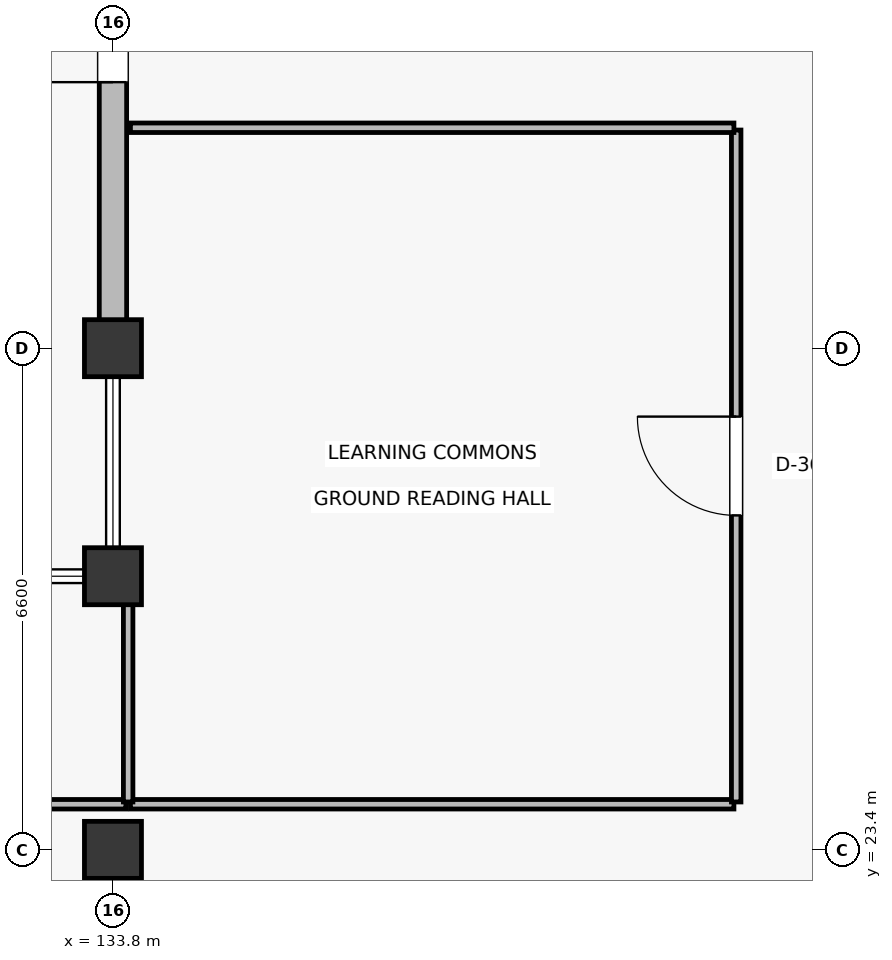
"""IFC4 building model, lengths in metres.
Left out: names, types, materials, properties, quantities, classifications, styles, units other than length and angle.
Written with IfcOpenShell. Run it as: python <this file> out.ifc"""

import sys

from ifc_helpers import new_model, si_unit, direction, frame, frame_2d, origin, origin_2d, place, context, subcontext, project, spatial, rectangle, extrude, element, fill, save


model = new_model("IFC4")
c1 = context("Model", 3, precision=1e-05, world=origin(), true_north=direction((0.0, 1.0)))
c2 = subcontext(c1, "Body", "Model", "MODEL_VIEW")
j1 = project(units=[si_unit("LENGTHUNIT", "METRE"), si_unit("PLANEANGLEUNIT", "RADIAN")], contexts=[c1])
p1 = place(None, origin())
s1 = spatial("IfcSite", under=j1, at=p1, CompositionType="ELEMENT")
p2 = place(p1, origin())
s2 = spatial("IfcBuilding", under=s1, at=p2, CompositionType="ELEMENT")
p3 = place(p2, origin())
s3 = spatial("IfcBuildingStorey", under=s2, at=p3, CompositionType="ELEMENT", Elevation=0.0)
for number, where, z_axis, x_axis in (
    (1, (133.8, 27.0, 0.0), (0.0, 0.0, 1.0), (1.0, 0.0, 0.0)),
    (2, (133.8, 23.4, 0.0), (0.0, 0.0, 1.0), (1.0, 0.0, 0.0)),
    (3, (133.8, 30.0, 0.0), (0.0, 0.0, 1.0), (1.0, 0.0, 0.0)),
):
    element("IfcColumn", number, at=place(p3, frame(where, z_axis=z_axis, x_axis=x_axis)), inside=s3, PredefinedType="COLUMN", context=c2, shape_type="SweptSolid", body=[
        extrude(rectangle(XDim=0.75, YDim=0.75, at=origin_2d()), origin(), (0.0, 0.0, 1.0), 5.4),
    ])
p4 = place(p3, frame((133.8, 30.365, 0.0), z_axis=(0.0, 0.0, 1.0), x_axis=(0.0, 1.0, 0.0)))
e4 = element("IfcWall", 4, at=p4, inside=s3, PredefinedType="SOLIDWALL", context=c2, shape_type="SweptSolid", body=[
    extrude(rectangle(XDim=8.27, YDim=0.36, at=frame_2d((4.135, 0.0))), origin(), (0.0, 0.0, 1.0), 4.465),
])
p5 = place(p4, frame((3.135, 0.0, 0.0)))
e5 = element("IfcOpeningElement", 5, at=p5, cuts=e4, PredefinedType="OPENING", context=c2, shape_type="SweptSolid", body=[
    extrude(rectangle(XDim=2.0, YDim=2.4, at=frame_2d((1.0, 1.2))), frame((0.0, 0.19, 0.0), z_axis=(0.0, -1.0, 0.0), x_axis=(1.0, 0.0, 0.0)), (0.0, 0.0, 1.0), 0.38),
])
p6 = place(p3, frame((119.65, 24.0, 0.0), z_axis=(0.0, 0.0, 1.0), x_axis=(1.0, 0.0, 0.0)))
e6 = element("IfcWall", 6, at=p6, inside=s3, PredefinedType="PARTITIONING", context=c2, shape_type="SweptSolid", body=[
    extrude(rectangle(XDim=14.32, YDim=0.125, at=frame_2d((7.16, 0.0))), origin(), (0.0, 0.0, 1.0), 5.08),
])
p7 = place(p6, frame((6.57, 0.0, 0.0)))
e7 = element("IfcOpeningElement", 7, at=p7, cuts=e6, PredefinedType="OPENING", context=c2, shape_type="SweptSolid", body=[
    extrude(rectangle(XDim=1.18, YDim=2.2, at=frame_2d((0.59, 1.1))), frame((0.0, 0.073, 0.0), z_axis=(0.0, -1.0, 0.0), x_axis=(1.0, 0.0, 0.0)), (0.0, 0.0, 1.0), 0.145),
])
p8 = place(p3, frame((134.03, 24.0, 0.0), z_axis=(0.0, 0.0, 1.0), x_axis=(1.0, 0.0, 0.0)))
e8 = element("IfcWall", 8, at=p8, inside=s3, PredefinedType="PARTITIONING", context=c2, shape_type="SweptSolid", body=[
    extrude(rectangle(XDim=7.94, YDim=0.125, at=frame_2d((3.97, 0.0))), origin(), (0.0, 0.0, 1.0), 5.08),
])
p9 = place(p3, frame((142.0, 24.03, 0.0), z_axis=(0.0, 0.0, 1.0), x_axis=(0.0, 1.0, 0.0)))
e9 = element("IfcWall", 9, at=p9, inside=s3, PredefinedType="PARTITIONING", context=c2, shape_type="SweptSolid", body=[
    extrude(rectangle(XDim=8.84, YDim=0.125, at=frame_2d((4.42, 0.0))), origin(), (0.0, 0.0, 1.0), 4.155),
])
p10 = place(p9, frame((3.77, 0.0, 0.0)))
e10 = element("IfcOpeningElement", 10, at=p10, cuts=e9, PredefinedType="OPENING", context=c2, shape_type="SweptSolid", body=[
    extrude(rectangle(XDim=1.3, YDim=2.2, at=frame_2d((0.65, 1.1))), frame((0.0, 0.073, 0.0), z_axis=(0.0, -1.0, 0.0), x_axis=(1.0, 0.0, 0.0)), (0.0, 0.0, 1.0), 0.145),
])
p11 = place(p3, frame((134.03, 32.9, 0.0), z_axis=(0.0, 0.0, 1.0), x_axis=(1.0, 0.0, 0.0)))
e11 = element("IfcWall", 11, at=p11, inside=s3, PredefinedType="PARTITIONING", context=c2, shape_type="SweptSolid", body=[
    extrude(rectangle(XDim=7.94, YDim=0.125, at=frame_2d((3.97, 0.0))), origin(), (0.0, 0.0, 1.0), 4.465),
])
p12 = place(p3, frame((134.0, 24.03, 0.0), z_axis=(0.0, 0.0, 1.0), x_axis=(0.0, 1.0, 0.0)))
e12 = element("IfcWall", 12, at=p12, inside=s3, PredefinedType="PARTITIONING", context=c2, shape_type="SweptSolid", body=[
    extrude(rectangle(XDim=2.74, YDim=0.125, at=frame_2d((1.37, 0.0))), origin(), (0.0, 0.0, 1.0), 5.08),
])
p13 = place(p5, origin())
e13 = element("IfcDoor", 13, at=p13, inside=s3, OperationType="DOUBLE_DOOR_SINGLE_SWING", PredefinedType="DOOR", context=c2, shape_type="SweptSolid", body=[
    extrude(rectangle(XDim=2.0, YDim=2.4, at=frame_2d((1.0, 1.2))), frame((0.0, 0.025, 0.0), z_axis=(0.0, -1.0, 0.0), x_axis=(1.0, 0.0, 0.0)), (0.0, 0.0, 1.0), 0.05),
])
fill(e5, e13)
p14 = place(p10, origin())
e14 = element("IfcDoor", 14, at=p14, inside=s3, OperationType="SINGLE_SWING_RIGHT", PredefinedType="DOOR", context=c2, shape_type="SweptSolid", body=[
    extrude(rectangle(XDim=1.3, YDim=2.2, at=frame_2d((0.65, 1.1))), frame((0.0, 0.025, 0.0), z_axis=(0.0, -1.0, 0.0), x_axis=(1.0, 0.0, 0.0)), (0.0, 0.0, 1.0), 0.05),
])
fill(e10, e14)
save(model, sys.argv[1])
